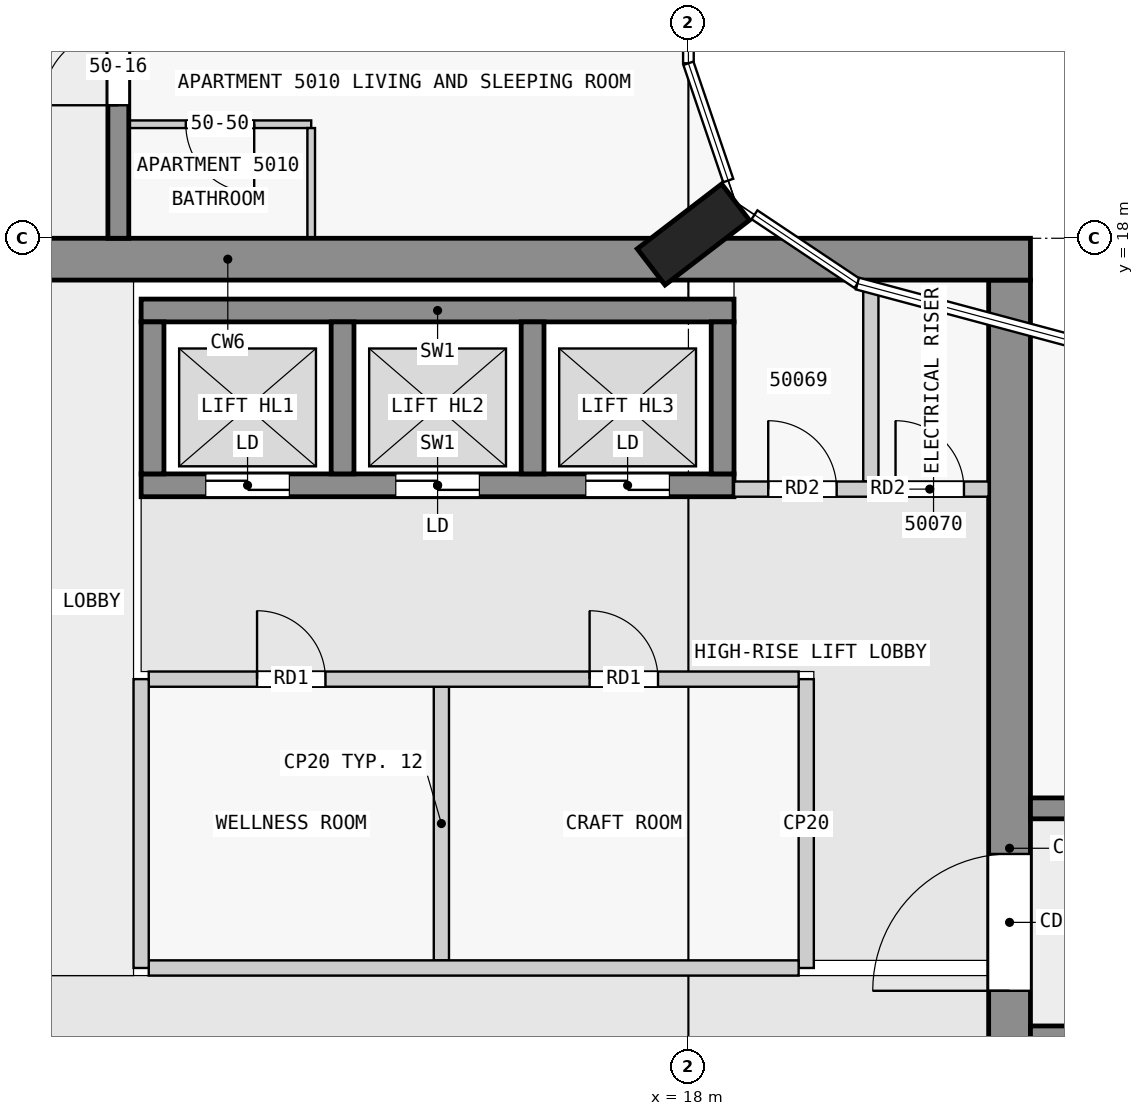
"""IFC4 building model, lengths in metres.
Left out: names, types, materials, properties, quantities, classifications, styles, units other than length and angle.
Written with IfcOpenShell. Run it as: python <this file> out.ifc"""

import sys

from ifc_helpers import new_model, si_unit, direction, frame, frame_2d, origin, origin_2d, place, context, subcontext, project, spatial, rectangle, extrude, element, fill, save


model = new_model("IFC4")
c1 = context("Model", 3, precision=1e-05, world=origin(), true_north=direction((0.0, 1.0)))
c2 = subcontext(c1, "Body", "Model", "MODEL_VIEW")
j1 = project(units=[si_unit("LENGTHUNIT", "METRE"), si_unit("PLANEANGLEUNIT", "RADIAN")], contexts=[c1])
p1 = place(None, origin())
s1 = spatial("IfcSite", under=j1, at=p1, CompositionType="ELEMENT")
p2 = place(p1, origin())
s2 = spatial("IfcBuilding", under=s1, at=p2, CompositionType="ELEMENT")
p3 = place(p2, frame((0.0, 0.0, 194.4)))
s3 = spatial("IfcBuildingStorey", under=s2, at=p3, CompositionType="ELEMENT", Elevation=194.4)
p4 = place(p3, frame((18.065, 18.05, 0.0), z_axis=(0.0, 0.0, 1.0), x_axis=(-0.608810846443, 0.793315418515, 0.0)))
e1 = element("IfcColumn", 1, at=p4, inside=s3, PredefinedType="COLUMN", context=c2, shape_type="SweptSolid", body=[
    extrude(rectangle(XDim=0.6, YDim=1.4, at=origin_2d()), origin(), (0.0, 0.0, 1.0), 3.5),
])
p5 = place(p3, frame((1.38, 17.725, 0.0), z_axis=(0.0, 0.0, 1.0), x_axis=(1.0, 0.0, 0.0)))
e2 = element("IfcWall", 2, at=p5, inside=s3, PredefinedType="SHEAR", context=c2, shape_type="SweptSolid", body=[
    extrude(rectangle(XDim=21.12, YDim=0.55, at=frame_2d((10.56, 0.0))), origin(), (0.0, 0.0, 1.0), 3.25),
])
p6 = place(p5, frame((6.35, 0.0, 0.0)))
e3 = element("IfcOpeningElement", 3, at=p6, cuts=e2, PredefinedType="OPENING", context=c2, shape_type="SweptSolid", body=[
    extrude(rectangle(XDim=1.8, YDim=2.1, at=frame_2d((0.9, 1.05))), frame((0.0, 0.285, 0.0), z_axis=(0.0, -1.0, 0.0), x_axis=(1.0, 0.0, 0.0)), (0.0, 0.0, 1.0), 0.57),
])
p7 = place(p3, frame((22.225, 2.5, 0.0), z_axis=(0.0, 0.0, 1.0), x_axis=(0.0, 1.0, 0.0)))
e4 = element("IfcWall", 4, at=p7, inside=s3, PredefinedType="SHEAR", context=c2, shape_type="SweptSolid", body=[
    extrude(rectangle(XDim=14.95, YDim=0.55, at=frame_2d((7.475, 0.0))), origin(), (0.0, 0.0, 1.0), 3.25),
])
p8 = place(p7, frame((5.6, 0.0, 0.0)))
e5 = element("IfcOpeningElement", 5, at=p8, cuts=e4, PredefinedType="OPENING", context=c2, shape_type="SweptSolid", body=[
    extrude(rectangle(XDim=1.8, YDim=2.1, at=frame_2d((0.9, 1.05))), frame((0.0, 0.285, 0.0), z_axis=(0.0, -1.0, 0.0), x_axis=(1.0, 0.0, 0.0)), (0.0, 0.0, 1.0), 0.57),
])
p9 = place(p3, frame((10.8, 17.05, 0.0), z_axis=(0.0, 0.0, 1.0), x_axis=(1.0, 0.0, 0.0)))
e6 = element("IfcWall", 6, at=p9, inside=s3, PredefinedType="SHEAR", context=c2, shape_type="SweptSolid", body=[
    extrude(rectangle(XDim=7.8, YDim=0.3, at=frame_2d((3.9, 0.0))), origin(), (0.0, 0.0, 1.0), 3.25),
])
p10 = place(p3, frame((10.8, 14.75, 0.0), z_axis=(0.0, 0.0, 1.0), x_axis=(1.0, 0.0, 0.0)))
e7 = element("IfcWall", 7, at=p10, inside=s3, PredefinedType="SHEAR", context=c2, shape_type="SweptSolid", body=[
    extrude(rectangle(XDim=7.8, YDim=0.3, at=frame_2d((3.9, 0.0))), origin(), (0.0, 0.0, 1.0), 3.25),
])
p11 = place(p10, frame((0.85, 0.0, 0.0)))
e8 = element("IfcOpeningElement", 8, at=p11, cuts=e7, PredefinedType="OPENING", context=c2, shape_type="SweptSolid", body=[
    extrude(rectangle(XDim=1.1, YDim=2.1, at=frame_2d((0.55, 1.05))), frame((0.0, 0.16, 0.0), z_axis=(0.0, -1.0, 0.0), x_axis=(1.0, 0.0, 0.0)), (0.0, 0.0, 1.0), 0.32),
])
p12 = place(p10, frame((3.35, 0.0, 0.0)))
e9 = element("IfcOpeningElement", 9, at=p12, cuts=e7, PredefinedType="OPENING", context=c2, shape_type="SweptSolid", body=[
    extrude(rectangle(XDim=1.1, YDim=2.1, at=frame_2d((0.55, 1.05))), frame((0.0, 0.16, 0.0), z_axis=(0.0, -1.0, 0.0), x_axis=(1.0, 0.0, 0.0)), (0.0, 0.0, 1.0), 0.32),
])
p13 = place(p10, frame((5.85, 0.0, 0.0)))
e10 = element("IfcOpeningElement", 10, at=p13, cuts=e7, PredefinedType="OPENING", context=c2, shape_type="SweptSolid", body=[
    extrude(rectangle(XDim=1.1, YDim=2.1, at=frame_2d((0.55, 1.05))), frame((0.0, 0.16, 0.0), z_axis=(0.0, -1.0, 0.0), x_axis=(1.0, 0.0, 0.0)), (0.0, 0.0, 1.0), 0.32),
])
for number, where, z_axis, x_axis in (
    (11, (10.95, 14.9, 0.0), (0.0, 0.0, 1.0), (0.0, 1.0, 0.0)),
    (12, (13.45, 14.9, 0.0), (0.0, 0.0, 1.0), (0.0, 1.0, 0.0)),
    (13, (15.95, 14.9, 0.0), (0.0, 0.0, 1.0), (0.0, 1.0, 0.0)),
    (14, (18.45, 14.9, 0.0), (0.0, 0.0, 1.0), (0.0, 1.0, 0.0)),
):
    element("IfcWall", number, at=place(p3, frame(where, z_axis=z_axis, x_axis=x_axis)), inside=s3, PredefinedType="SHEAR", context=c2, shape_type="SweptSolid", body=[
        extrude(rectangle(XDim=2.0, YDim=0.3, at=frame_2d((1.0, 0.0))), origin(), (0.0, 0.0, 1.0), 3.25),
    ])
p14 = place(p3, frame((22.5, 7.5, 0.0), z_axis=(0.0, 0.0, 1.0), x_axis=(1.0, 0.0, 0.0)))
e15 = element("IfcWall", 15, at=p14, inside=s3, PredefinedType="SHEAR", context=c2, shape_type="SweptSolid", body=[
    extrude(rectangle(XDim=22.5, YDim=0.275, at=frame_2d((11.25, 0.0))), origin(), (0.0, 0.0, 1.0), 3.25),
])
p15 = place(p14, frame((1.75, 0.0, 0.0)))
e16 = element("IfcOpeningElement", 16, at=p15, cuts=e15, PredefinedType="OPENING", context=c2, shape_type="SweptSolid", body=[
    extrude(rectangle(XDim=1.0, YDim=2.1, at=frame_2d((0.5, 1.05))), frame((0.0, 0.147, 0.0), z_axis=(0.0, -1.0, 0.0), x_axis=(1.0, 0.0, 0.0)), (0.0, 0.0, 1.0), 0.295),
])
p16 = place(p14, frame((5.85, 0.0, 0.0)))
e17 = element("IfcOpeningElement", 17, at=p16, cuts=e15, PredefinedType="OPENING", context=c2, shape_type="SweptSolid", body=[
    extrude(rectangle(XDim=1.8, YDim=2.1, at=frame_2d((0.9, 1.05))), frame((0.0, 0.147, 0.0), z_axis=(0.0, -1.0, 0.0), x_axis=(1.0, 0.0, 0.0)), (0.0, 0.0, 1.0), 0.295),
])
p17 = place(p14, frame((10.75, 0.0, 0.0)))
e18 = element("IfcOpeningElement", 18, at=p17, cuts=e15, PredefinedType="OPENING", context=c2, shape_type="SweptSolid", body=[
    extrude(rectangle(XDim=1.0, YDim=2.1, at=frame_2d((0.5, 1.05))), frame((0.0, 0.147, 0.0), z_axis=(0.0, -1.0, 0.0), x_axis=(1.0, 0.0, 0.0)), (0.0, 0.0, 1.0), 0.295),
])
p18 = place(p14, frame((16.85, 0.0, 0.0)))
e19 = element("IfcOpeningElement", 19, at=p18, cuts=e15, PredefinedType="OPENING", context=c2, shape_type="SweptSolid", body=[
    extrude(rectangle(XDim=1.0, YDim=2.1, at=frame_2d((0.5, 1.05))), frame((0.0, 0.147, 0.0), z_axis=(0.0, -1.0, 0.0), x_axis=(1.0, 0.0, 0.0)), (0.0, 0.0, 1.0), 0.295),
])
p19 = place(p3, frame((22.5, 10.5, 0.0), z_axis=(0.0, 0.0, 1.0), x_axis=(1.0, 0.0, 0.0)))
e20 = element("IfcWall", 20, at=p19, inside=s3, PredefinedType="SHEAR", context=c2, shape_type="SweptSolid", body=[
    extrude(rectangle(XDim=22.5, YDim=0.275, at=frame_2d((11.25, 0.0))), origin(), (0.0, 0.0, 1.0), 3.25),
])
p20 = place(p19, frame((1.75, 0.0, 0.0)))
e21 = element("IfcOpeningElement", 21, at=p20, cuts=e20, PredefinedType="OPENING", context=c2, shape_type="SweptSolid", body=[
    extrude(rectangle(XDim=1.0, YDim=2.1, at=frame_2d((0.5, 1.05))), frame((0.0, 0.147, 0.0), z_axis=(0.0, -1.0, 0.0), x_axis=(1.0, 0.0, 0.0)), (0.0, 0.0, 1.0), 0.295),
])
p21 = place(p19, frame((6.25, 0.0, 0.0)))
e22 = element("IfcOpeningElement", 22, at=p21, cuts=e20, PredefinedType="OPENING", context=c2, shape_type="SweptSolid", body=[
    extrude(rectangle(XDim=1.0, YDim=2.1, at=frame_2d((0.5, 1.05))), frame((0.0, 0.147, 0.0), z_axis=(0.0, -1.0, 0.0), x_axis=(1.0, 0.0, 0.0)), (0.0, 0.0, 1.0), 0.295),
])
p22 = place(p19, frame((10.75, 0.0, 0.0)))
e23 = element("IfcOpeningElement", 23, at=p22, cuts=e20, PredefinedType="OPENING", context=c2, shape_type="SweptSolid", body=[
    extrude(rectangle(XDim=1.0, YDim=2.1, at=frame_2d((0.5, 1.05))), frame((0.0, 0.147, 0.0), z_axis=(0.0, -1.0, 0.0), x_axis=(1.0, 0.0, 0.0)), (0.0, 0.0, 1.0), 0.295),
])
p23 = place(p19, frame((15.25, 0.0, 0.0)))
e24 = element("IfcOpeningElement", 24, at=p23, cuts=e20, PredefinedType="OPENING", context=c2, shape_type="SweptSolid", body=[
    extrude(rectangle(XDim=1.0, YDim=2.1, at=frame_2d((0.5, 1.05))), frame((0.0, 0.147, 0.0), z_axis=(0.0, -1.0, 0.0), x_axis=(1.0, 0.0, 0.0)), (0.0, 0.0, 1.0), 0.295),
])
p24 = place(p19, frame((18.75, 0.0, 0.0)))
e25 = element("IfcOpeningElement", 25, at=p24, cuts=e20, PredefinedType="OPENING", context=c2, shape_type="SweptSolid", body=[
    extrude(rectangle(XDim=0.9, YDim=2.1, at=frame_2d((0.45, 1.05))), frame((0.0, 0.147, 0.0), z_axis=(0.0, -1.0, 0.0), x_axis=(1.0, 0.0, 0.0)), (0.0, 0.0, 1.0), 0.295),
])
p25 = place(p19, frame((20.95, 0.0, 0.0)))
e26 = element("IfcOpeningElement", 26, at=p25, cuts=e20, PredefinedType="OPENING", context=c2, shape_type="SweptSolid", body=[
    extrude(rectangle(XDim=1.0, YDim=2.1, at=frame_2d((0.5, 1.05))), frame((0.0, 0.147, 0.0), z_axis=(0.0, -1.0, 0.0), x_axis=(1.0, 0.0, 0.0)), (0.0, 0.0, 1.0), 0.295),
])
p26 = place(p3, frame((10.5, 18.0, 0.0), z_axis=(0.0, 0.0, 1.0), x_axis=(0.0, 1.0, 0.0)))
e27 = element("IfcWall", 27, at=p26, inside=s3, PredefinedType="SHEAR", context=c2, shape_type="SweptSolid", body=[
    extrude(rectangle(XDim=27.0, YDim=0.275, at=frame_2d((13.5, 0.0))), origin(), (0.0, 0.0, 1.0), 3.25),
])
p27 = place(p26, frame((1.75, 0.0, 0.0)))
e28 = element("IfcOpeningElement", 28, at=p27, cuts=e27, PredefinedType="OPENING", context=c2, shape_type="SweptSolid", body=[
    extrude(rectangle(XDim=1.0, YDim=2.1, at=frame_2d((0.5, 1.05))), frame((0.0, 0.147, 0.0), z_axis=(0.0, -1.0, 0.0), x_axis=(1.0, 0.0, 0.0)), (0.0, 0.0, 1.0), 0.295),
])
p28 = place(p26, frame((6.25, 0.0, 0.0)))
e29 = element("IfcOpeningElement", 29, at=p28, cuts=e27, PredefinedType="OPENING", context=c2, shape_type="SweptSolid", body=[
    extrude(rectangle(XDim=1.0, YDim=2.1, at=frame_2d((0.5, 1.05))), frame((0.0, 0.147, 0.0), z_axis=(0.0, -1.0, 0.0), x_axis=(1.0, 0.0, 0.0)), (0.0, 0.0, 1.0), 0.295),
])
p29 = place(p26, frame((15.25, 0.0, 0.0)))
e30 = element("IfcOpeningElement", 30, at=p29, cuts=e27, PredefinedType="OPENING", context=c2, shape_type="SweptSolid", body=[
    extrude(rectangle(XDim=1.0, YDim=2.1, at=frame_2d((0.5, 1.05))), frame((0.0, 0.147, 0.0), z_axis=(0.0, -1.0, 0.0), x_axis=(1.0, 0.0, 0.0)), (0.0, 0.0, 1.0), 0.295),
])
p30 = place(p26, frame((19.75, 0.0, 0.0)))
e31 = element("IfcOpeningElement", 31, at=p30, cuts=e27, PredefinedType="OPENING", context=c2, shape_type="SweptSolid", body=[
    extrude(rectangle(XDim=1.0, YDim=2.1, at=frame_2d((0.5, 1.05))), frame((0.0, 0.147, 0.0), z_axis=(0.0, -1.0, 0.0), x_axis=(1.0, 0.0, 0.0)), (0.0, 0.0, 1.0), 0.295),
])
p31 = place(p26, frame((23.25, 0.0, 0.0)))
e32 = element("IfcOpeningElement", 32, at=p31, cuts=e27, PredefinedType="OPENING", context=c2, shape_type="SweptSolid", body=[
    extrude(rectangle(XDim=0.9, YDim=2.1, at=frame_2d((0.45, 1.05))), frame((0.0, 0.147, 0.0), z_axis=(0.0, -1.0, 0.0), x_axis=(1.0, 0.0, 0.0)), (0.0, 0.0, 1.0), 0.295),
])
p32 = place(p26, frame((25.45, 0.0, 0.0)))
e33 = element("IfcOpeningElement", 33, at=p32, cuts=e27, PredefinedType="OPENING", context=c2, shape_type="SweptSolid", body=[
    extrude(rectangle(XDim=1.0, YDim=2.1, at=frame_2d((0.5, 1.05))), frame((0.0, 0.147, 0.0), z_axis=(0.0, -1.0, 0.0), x_axis=(1.0, 0.0, 0.0)), (0.0, 0.0, 1.0), 0.295),
])
p33 = place(p3, frame((10.8, 8.4, 0.0), z_axis=(0.0, 0.0, 1.0), x_axis=(0.0, 1.0, 0.0)))
e34 = element("IfcWall", 34, at=p33, inside=s3, PredefinedType="PARTITIONING", context=c2, shape_type="SweptSolid", body=[
    extrude(rectangle(XDim=3.8, YDim=0.2, at=frame_2d((1.9, 0.0))), origin(), (0.0, 0.0, 1.0), 3.25),
])
p34 = place(p3, frame((10.9, 8.4, 0.0), z_axis=(0.0, 0.0, 1.0), x_axis=(1.0, 0.0, 0.0)))
e35 = element("IfcWall", 35, at=p34, inside=s3, PredefinedType="PARTITIONING", context=c2, shape_type="SweptSolid", body=[
    extrude(rectangle(XDim=8.55, YDim=0.2, at=frame_2d((4.275, 0.0))), origin(), (0.0, 0.0, 1.0), 3.25),
])
p35 = place(p3, frame((19.55, 8.4, 0.0), z_axis=(0.0, 0.0, 1.0), x_axis=(0.0, 1.0, 0.0)))
e36 = element("IfcWall", 36, at=p35, inside=s3, PredefinedType="PARTITIONING", context=c2, shape_type="SweptSolid", body=[
    extrude(rectangle(XDim=3.8, YDim=0.2, at=frame_2d((1.9, 0.0))), origin(), (0.0, 0.0, 1.0), 3.25),
])
p36 = place(p3, frame((10.9, 12.2, 0.0), z_axis=(0.0, 0.0, 1.0), x_axis=(1.0, 0.0, 0.0)))
e37 = element("IfcWall", 37, at=p36, inside=s3, PredefinedType="PARTITIONING", context=c2, shape_type="SweptSolid", body=[
    extrude(rectangle(XDim=8.55, YDim=0.2, at=frame_2d((4.275, 0.0))), origin(), (0.0, 0.0, 1.0), 3.25),
])
p37 = place(p36, frame((1.425, 0.0, 0.0)))
e38 = element("IfcOpeningElement", 38, at=p37, cuts=e37, PredefinedType="OPENING", context=c2, shape_type="SweptSolid", body=[
    extrude(rectangle(XDim=0.9, YDim=2.1, at=frame_2d((0.45, 1.05))), frame((0.0, 0.11, 0.0), z_axis=(0.0, -1.0, 0.0), x_axis=(1.0, 0.0, 0.0)), (0.0, 0.0, 1.0), 0.22),
])
p38 = place(p36, frame((5.8, 0.0, 0.0)))
e39 = element("IfcOpeningElement", 39, at=p38, cuts=e37, PredefinedType="OPENING", context=c2, shape_type="SweptSolid", body=[
    extrude(rectangle(XDim=0.9, YDim=2.1, at=frame_2d((0.45, 1.05))), frame((0.0, 0.11, 0.0), z_axis=(0.0, -1.0, 0.0), x_axis=(1.0, 0.0, 0.0)), (0.0, 0.0, 1.0), 0.22),
])
p39 = place(p3, frame((14.75, 8.5, 0.0), z_axis=(0.0, 0.0, 1.0), x_axis=(0.0, 1.0, 0.0)))
e40 = element("IfcWall", 40, at=p39, inside=s3, PredefinedType="PARTITIONING", context=c2, shape_type="SweptSolid", body=[
    extrude(rectangle(XDim=3.6, YDim=0.2, at=frame_2d((1.8, 0.0))), origin(), (0.0, 0.0, 1.0), 3.25),
])
p40 = place(p3, frame((18.6, 14.7, 0.0), z_axis=(0.0, 0.0, 1.0), x_axis=(1.0, 0.0, 0.0)))
e41 = element("IfcWall", 41, at=p40, inside=s3, PredefinedType="PARTITIONING", context=c2, shape_type="SweptSolid", body=[
    extrude(rectangle(XDim=3.35, YDim=0.2, at=frame_2d((1.675, 0.0))), origin(), (0.0, 0.0, 1.0), 3.25),
])
p41 = place(p40, frame((0.45, 0.0, 0.0)))
e42 = element("IfcOpeningElement", 42, at=p41, cuts=e41, PredefinedType="OPENING", context=c2, shape_type="SweptSolid", body=[
    extrude(rectangle(XDim=0.9, YDim=2.1, at=frame_2d((0.45, 1.05))), frame((0.0, 0.11, 0.0), z_axis=(0.0, -1.0, 0.0), x_axis=(1.0, 0.0, 0.0)), (0.0, 0.0, 1.0), 0.22),
])
p42 = place(p40, frame((2.125, 0.0, 0.0)))
e43 = element("IfcOpeningElement", 43, at=p42, cuts=e41, PredefinedType="OPENING", context=c2, shape_type="SweptSolid", body=[
    extrude(rectangle(XDim=0.9, YDim=2.1, at=frame_2d((0.45, 1.05))), frame((0.0, 0.11, 0.0), z_axis=(0.0, -1.0, 0.0), x_axis=(1.0, 0.0, 0.0)), (0.0, 0.0, 1.0), 0.22),
])
p43 = place(p3, frame((20.4, 14.8, 0.0), z_axis=(0.0, 0.0, 1.0), x_axis=(0.0, 1.0, 0.0)))
e44 = element("IfcWall", 44, at=p43, inside=s3, PredefinedType="PARTITIONING", context=c2, shape_type="SweptSolid", body=[
    extrude(rectangle(XDim=2.65, YDim=0.2, at=frame_2d((1.325, 0.0))), origin(), (0.0, 0.0, 1.0), 3.25),
])
p44 = place(p3, frame((13.038, 19.5, 0.0), z_axis=(0.0, 0.0, 1.0), x_axis=(-1.0, 0.0, 0.0)))
e45 = element("IfcWall", 45, at=p44, inside=s3, PredefinedType="PARTITIONING", context=c2, shape_type="SweptSolid", body=[
    extrude(rectangle(XDim=2.4, YDim=0.1, at=frame_2d((1.2, 0.0))), origin(), (0.0, 0.0, 1.0), 3.25),
])
p45 = place(p44, frame((0.75, 0.0, 0.0)))
e46 = element("IfcOpeningElement", 46, at=p45, cuts=e45, PredefinedType="OPENING", context=c2, shape_type="SweptSolid", body=[
    extrude(rectangle(XDim=0.9, YDim=2.1, at=frame_2d((0.45, 1.05))), frame((0.0, 0.06, 0.0), z_axis=(0.0, -1.0, 0.0), x_axis=(1.0, 0.0, 0.0)), (0.0, 0.0, 1.0), 0.12),
])
p46 = place(p3, frame((13.038, 18.0, 0.0), z_axis=(0.0, 0.0, 1.0), x_axis=(0.0, 1.0, 0.0)))
e47 = element("IfcWall", 47, at=p46, inside=s3, PredefinedType="PARTITIONING", context=c2, shape_type="SweptSolid", body=[
    extrude(rectangle(XDim=1.45, YDim=0.1, at=frame_2d((0.725, 0.0))), origin(), (0.0, 0.0, 1.0), 3.25),
])
p47 = place(p37, origin())
e48 = element("IfcDoor", 48, at=p47, inside=s3, OperationType="SINGLE_SWING_LEFT", PredefinedType="DOOR", context=c2, shape_type="SweptSolid", body=[
    extrude(rectangle(XDim=0.9, YDim=2.1, at=frame_2d((0.45, 1.05))), frame((0.0, 0.025, 0.0), z_axis=(0.0, -1.0, 0.0), x_axis=(1.0, 0.0, 0.0)), (0.0, 0.0, 1.0), 0.05),
])
fill(e38, e48)
p48 = place(p38, origin())
e49 = element("IfcDoor", 49, at=p48, inside=s3, OperationType="SINGLE_SWING_LEFT", PredefinedType="DOOR", context=c2, shape_type="SweptSolid", body=[
    extrude(rectangle(XDim=0.9, YDim=2.1, at=frame_2d((0.45, 1.05))), frame((0.0, 0.025, 0.0), z_axis=(0.0, -1.0, 0.0), x_axis=(1.0, 0.0, 0.0)), (0.0, 0.0, 1.0), 0.05),
])
fill(e39, e49)
p49 = place(p11, origin())
e50 = element("IfcDoor", 50, at=p49, inside=s3, OperationType="DOUBLE_DOOR_SLIDING", PredefinedType="DOOR", context=c2, shape_type="SweptSolid", body=[
    extrude(rectangle(XDim=1.1, YDim=2.1, at=frame_2d((0.55, 1.05))), frame((0.0, 0.025, 0.0), z_axis=(0.0, -1.0, 0.0), x_axis=(1.0, 0.0, 0.0)), (0.0, 0.0, 1.0), 0.05),
])
fill(e8, e50)
p50 = place(p12, origin())
e51 = element("IfcDoor", 51, at=p50, inside=s3, OperationType="DOUBLE_DOOR_SLIDING", PredefinedType="DOOR", context=c2, shape_type="SweptSolid", body=[
    extrude(rectangle(XDim=1.1, YDim=2.1, at=frame_2d((0.55, 1.05))), frame((0.0, 0.025, 0.0), z_axis=(0.0, -1.0, 0.0), x_axis=(1.0, 0.0, 0.0)), (0.0, 0.0, 1.0), 0.05),
])
fill(e9, e51)
p51 = place(p13, origin())
e52 = element("IfcDoor", 52, at=p51, inside=s3, OperationType="DOUBLE_DOOR_SLIDING", PredefinedType="DOOR", context=c2, shape_type="SweptSolid", body=[
    extrude(rectangle(XDim=1.1, YDim=2.1, at=frame_2d((0.55, 1.05))), frame((0.0, 0.025, 0.0), z_axis=(0.0, -1.0, 0.0), x_axis=(1.0, 0.0, 0.0)), (0.0, 0.0, 1.0), 0.05),
])
fill(e10, e52)
p52 = place(p8, origin())
e53 = element("IfcDoor", 53, at=p52, inside=s3, OperationType="DOUBLE_DOOR_SINGLE_SWING", PredefinedType="DOOR", context=c2, shape_type="SweptSolid", body=[
    extrude(rectangle(XDim=1.8, YDim=2.1, at=frame_2d((0.9, 1.05))), frame((0.0, 0.025, 0.0), z_axis=(0.0, -1.0, 0.0), x_axis=(1.0, 0.0, 0.0)), (0.0, 0.0, 1.0), 0.05),
])
fill(e5, e53)
p53 = place(p41, origin())
e54 = element("IfcDoor", 54, at=p53, inside=s3, OperationType="SINGLE_SWING_LEFT", PredefinedType="DOOR", context=c2, shape_type="SweptSolid", body=[
    extrude(rectangle(XDim=0.9, YDim=2.1, at=frame_2d((0.45, 1.05))), frame((0.0, 0.025, 0.0), z_axis=(0.0, -1.0, 0.0), x_axis=(1.0, 0.0, 0.0)), (0.0, 0.0, 1.0), 0.05),
])
fill(e42, e54)
p54 = place(p42, origin())
e55 = element("IfcDoor", 55, at=p54, inside=s3, OperationType="SINGLE_SWING_LEFT", PredefinedType="DOOR", context=c2, shape_type="SweptSolid", body=[
    extrude(rectangle(XDim=0.9, YDim=2.1, at=frame_2d((0.45, 1.05))), frame((0.0, 0.025, 0.0), z_axis=(0.0, -1.0, 0.0), x_axis=(1.0, 0.0, 0.0)), (0.0, 0.0, 1.0), 0.05),
])
fill(e43, e55)
p55 = place(p27, origin())
e56 = element("IfcDoor", 56, at=p55, inside=s3, OperationType="SINGLE_SWING_LEFT", PredefinedType="DOOR", context=c2, shape_type="SweptSolid", body=[
    extrude(rectangle(XDim=1.0, YDim=2.1, at=frame_2d((0.5, 1.05))), frame((0.0, 0.025, 0.0), z_axis=(0.0, -1.0, 0.0), x_axis=(1.0, 0.0, 0.0)), (0.0, 0.0, 1.0), 0.05),
])
fill(e28, e56)
p56 = place(p45, origin())
e57 = element("IfcDoor", 57, at=p56, inside=s3, OperationType="SINGLE_SWING_LEFT", PredefinedType="DOOR", context=c2, shape_type="SweptSolid", body=[
    extrude(rectangle(XDim=0.9, YDim=2.1, at=frame_2d((0.45, 1.05))), frame((0.0, 0.025, 0.0), z_axis=(0.0, -1.0, 0.0), x_axis=(1.0, 0.0, 0.0)), (0.0, 0.0, 1.0), 0.05),
])
fill(e46, e57)
save(model, sys.argv[1])
